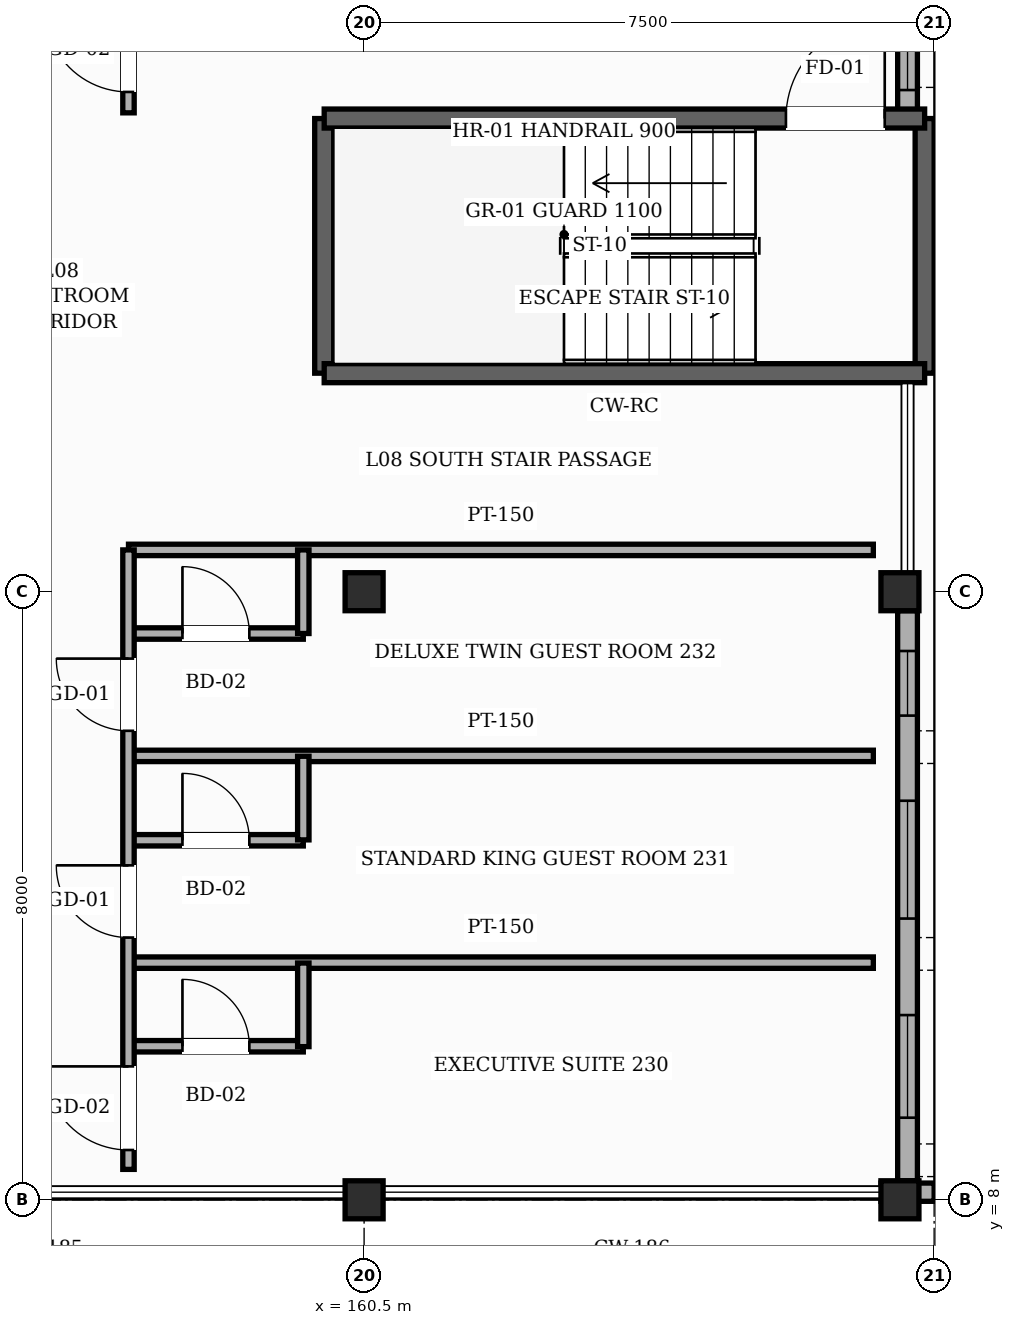
"""IFC4 building model, lengths in metres.
Left out: names, types, materials, properties, quantities, classifications, styles, units other than length and angle.
Written with IfcOpenShell. Run it as: python <this file> out.ifc"""

import sys

from ifc_helpers import new_model, si_unit, direction, frame, frame_2d, origin, origin_2d, place, context, subcontext, project, spatial, rectangle, hollow_rectangle, extrude, element, fill, save


model = new_model("IFC4")
c1 = context("Model", 3, precision=1e-05, world=origin(), true_north=direction((0.0, 1.0)))
c2 = subcontext(c1, "Body", "Model", "MODEL_VIEW")
j1 = project(units=[si_unit("LENGTHUNIT", "METRE"), si_unit("PLANEANGLEUNIT", "RADIAN")], contexts=[c1])
p1 = place(None, origin())
s1 = spatial("IfcSite", under=j1, at=p1, CompositionType="ELEMENT")
p2 = place(p1, origin())
s2 = spatial("IfcBuilding", under=s1, at=p2, CompositionType="ELEMENT")
p3 = place(p2, frame((0.0, 0.0, 35.4)))
s3 = spatial("IfcBuildingStorey", under=s2, at=p3, CompositionType="ELEMENT", Elevation=35.4)
for number, where, z_axis, x_axis in (
    (1, (160.5, 8.0, 0.0), (0.0, 0.0, 1.0), (1.0, 0.0, 0.0)),
    (2, (160.5, 16.0, 0.0), (0.0, 0.0, 1.0), (1.0, 0.0, 0.0)),
    (3, (167.55, 8.0, 0.0), (0.0, 0.0, 1.0), (1.0, 0.0, 0.0)),
    (4, (167.55, 16.0, 0.0), (0.0, 0.0, 1.0), (1.0, 0.0, 0.0)),
):
    element("IfcColumn", number, at=place(p3, frame(where, z_axis=z_axis, x_axis=x_axis)), inside=s3, PredefinedType="COLUMN", context=c2, shape_type="SweptSolid", body=[
        extrude(hollow_rectangle(XDim=0.5, YDim=0.5, WallThickness=0.022, InnerFilletRadius=0.022, OuterFilletRadius=0.044, at=origin_2d()), origin(), (0.0, 0.0, 1.0), 3.6),
    ])
p4 = place(p3, frame((167.65, 15.75, 0.0), z_axis=(0.0, 0.0, 1.0), x_axis=(0.0, -1.0, 0.0)))
e5 = element("IfcWall", 5, at=p4, inside=s3, PredefinedType="SOLIDWALL", context=c2, shape_type="SweptSolid", body=[
    extrude(rectangle(XDim=7.5, YDim=0.26, at=frame_2d((3.75, 0.0))), origin(), (0.0, 0.0, 1.0), 2.755),
])
p5 = place(p4, frame((5.32, 0.0, 0.85)))
e6 = element("IfcOpeningElement", 6, at=p5, cuts=e5, PredefinedType="OPENING", context=c2, shape_type="SweptSolid", body=[
    extrude(rectangle(XDim=1.35, YDim=1.65, at=frame_2d((0.675, 0.825))), frame((0.0, 0.14, 0.0), z_axis=(0.0, -1.0, 0.0), x_axis=(1.0, 0.0, 0.0)), (0.0, 0.0, 1.0), 0.28),
])
p6 = place(p4, frame((2.5, 0.0, 0.85)))
e7 = element("IfcOpeningElement", 7, at=p6, cuts=e5, PredefinedType="OPENING", context=c2, shape_type="SweptSolid", body=[
    extrude(rectangle(XDim=1.55, YDim=1.65, at=frame_2d((0.775, 0.825))), frame((0.0, 0.14, 0.0), z_axis=(0.0, -1.0, 0.0), x_axis=(1.0, 0.0, 0.0)), (0.0, 0.0, 1.0), 0.28),
])
p7 = place(p4, frame((0.53, 0.0, 0.85)))
e8 = element("IfcOpeningElement", 8, at=p7, cuts=e5, PredefinedType="OPENING", context=c2, shape_type="SweptSolid", body=[
    extrude(rectangle(XDim=0.85, YDim=1.35, at=frame_2d((0.425, 0.675))), frame((0.0, 0.14, 0.0), z_axis=(0.0, -1.0, 0.0), x_axis=(1.0, 0.0, 0.0)), (0.0, 0.0, 1.0), 0.28),
])
p8 = place(p3, frame((167.65, 23.75, 0.0), z_axis=(0.0, 0.0, 1.0), x_axis=(0.0, -1.0, 0.0)))
e9 = element("IfcWall", 9, at=p8, inside=s3, PredefinedType="SOLIDWALL", context=c2, shape_type="SweptSolid", body=[
    extrude(rectangle(XDim=1.525, YDim=0.26, at=frame_2d((0.762, 0.0))), origin(), (0.0, 0.0, 1.0), 3.365),
])
p9 = place(p8, frame((0.3, 0.0, 0.85)))
e10 = element("IfcOpeningElement", 10, at=p9, cuts=e9, PredefinedType="OPENING", context=c2, shape_type="SweptSolid", body=[
    extrude(rectangle(XDim=0.85, YDim=1.35, at=frame_2d((0.425, 0.675))), frame((0.0, 0.14, 0.0), z_axis=(0.0, -1.0, 0.0), x_axis=(1.0, 0.0, 0.0)), (0.0, 0.0, 1.0), 0.28),
])
p10 = place(p3, frame((168.0, 8.1, 0.0), z_axis=(0.0, 0.0, 1.0), x_axis=(-1.0, 0.0, 0.0)))
e11 = element("IfcWall", 11, at=p10, inside=s3, PredefinedType="SOLIDWALL", context=c2, shape_type="SweptSolid", body=[
    extrude(rectangle(XDim=0.7, YDim=0.24, at=frame_2d((0.35, 0.0))), origin(), (0.0, 0.0, 1.0), 3.365),
])
for number, where, z_axis, x_axis in (
    (12, (167.875, 22.225, 0.0), (0.0, 0.0, 1.0), (0.0, -1.0, 0.0)),
    (13, (159.975, 18.875, 0.0), (0.0, 0.0, 1.0), (0.0, 1.0, 0.0)),
):
    element("IfcWall", number, at=place(p3, frame(where, z_axis=z_axis, x_axis=x_axis)), inside=s3, PredefinedType="SHEAR", context=c2, shape_type="SweptSolid", body=[
        extrude(rectangle(XDim=3.35, YDim=0.25, at=frame_2d((1.675, 0.0))), origin(), (0.0, 0.0, 1.0), 3.38),
    ])
p11 = place(p3, frame((159.975, 22.225, 0.0), z_axis=(0.0, 0.0, 1.0), x_axis=(1.0, 0.0, 0.0)))
e14 = element("IfcWall", 14, at=p11, inside=s3, PredefinedType="SHEAR", context=c2, shape_type="SweptSolid", body=[
    extrude(rectangle(XDim=7.9, YDim=0.25, at=frame_2d((3.95, 0.0))), origin(), (0.0, 0.0, 1.0), 3.38),
])
p12 = place(p11, frame((6.075, 0.0, 0.0)))
e15 = element("IfcOpeningElement", 15, at=p12, cuts=e14, PredefinedType="OPENING", context=c2, shape_type="SweptSolid", body=[
    extrude(rectangle(XDim=1.3, YDim=2.2, at=frame_2d((0.65, 1.1))), frame((0.0, 0.135, 0.0), z_axis=(0.0, -1.0, 0.0), x_axis=(1.0, 0.0, 0.0)), (0.0, 0.0, 1.0), 0.27),
])
p13 = place(p3, frame((167.875, 18.875, 0.0), z_axis=(0.0, 0.0, 1.0), x_axis=(-1.0, 0.0, 0.0)))
e16 = element("IfcWall", 16, at=p13, inside=s3, PredefinedType="SHEAR", context=c2, shape_type="SweptSolid", body=[
    extrude(rectangle(XDim=7.9, YDim=0.25, at=frame_2d((3.95, 0.0))), origin(), (0.0, 0.0, 1.0), 3.38),
])
p14 = place(p3, frame((157.4, 10.02, 0.0), z_axis=(0.0, 0.0, 1.0), x_axis=(1.0, 0.0, 0.0)))
e17 = element("IfcWall", 17, at=p14, inside=s3, PredefinedType="PARTITIONING", context=c2, shape_type="SweptSolid", body=[
    extrude(rectangle(XDim=2.3, YDim=0.15, at=frame_2d((1.15, 0.0))), origin(), (0.0, 0.0, 1.0), 3.365),
])
p15 = place(p14, frame((0.71, 0.0, 0.0)))
e18 = element("IfcOpeningElement", 18, at=p15, cuts=e17, PredefinedType="OPENING", context=c2, shape_type="SweptSolid", body=[
    extrude(rectangle(XDim=0.88, YDim=2.12, at=frame_2d((0.44, 1.06))), frame((0.0, 0.085, 0.0), z_axis=(0.0, -1.0, 0.0), x_axis=(1.0, 0.0, 0.0)), (0.0, 0.0, 1.0), 0.17),
])
p16 = place(p3, frame((157.4, 11.12, 0.0), z_axis=(0.0, 0.0, 1.0), x_axis=(1.0, 0.0, 0.0)))
e19 = element("IfcWall", 19, at=p16, inside=s3, PredefinedType="PARTITIONING", context=c2, shape_type="SweptSolid", body=[
    extrude(rectangle(XDim=9.8, YDim=0.15, at=frame_2d((4.9, 0.0))), origin(), (0.0, 0.0, 1.0), 3.365),
])
p17 = place(p3, frame((157.4, 12.73, 0.0), z_axis=(0.0, 0.0, 1.0), x_axis=(1.0, 0.0, 0.0)))
e20 = element("IfcWall", 20, at=p17, inside=s3, PredefinedType="PARTITIONING", context=c2, shape_type="SweptSolid", body=[
    extrude(rectangle(XDim=2.3, YDim=0.15, at=frame_2d((1.15, 0.0))), origin(), (0.0, 0.0, 1.0), 3.365),
])
p18 = place(p17, frame((0.71, 0.0, 0.0)))
e21 = element("IfcOpeningElement", 21, at=p18, cuts=e20, PredefinedType="OPENING", context=c2, shape_type="SweptSolid", body=[
    extrude(rectangle(XDim=0.88, YDim=2.12, at=frame_2d((0.44, 1.06))), frame((0.0, 0.085, 0.0), z_axis=(0.0, -1.0, 0.0), x_axis=(1.0, 0.0, 0.0)), (0.0, 0.0, 1.0), 0.17),
])
p19 = place(p3, frame((157.4, 13.84, 0.0), z_axis=(0.0, 0.0, 1.0), x_axis=(1.0, 0.0, 0.0)))
e22 = element("IfcWall", 22, at=p19, inside=s3, PredefinedType="PARTITIONING", context=c2, shape_type="SweptSolid", body=[
    extrude(rectangle(XDim=9.8, YDim=0.15, at=frame_2d((4.9, 0.0))), origin(), (0.0, 0.0, 1.0), 3.365),
])
p20 = place(p3, frame((157.4, 15.45, 0.0), z_axis=(0.0, 0.0, 1.0), x_axis=(1.0, 0.0, 0.0)))
e23 = element("IfcWall", 23, at=p20, inside=s3, PredefinedType="PARTITIONING", context=c2, shape_type="SweptSolid", body=[
    extrude(rectangle(XDim=2.3, YDim=0.15, at=frame_2d((1.15, 0.0))), origin(), (0.0, 0.0, 1.0), 3.365),
])
p21 = place(p20, frame((0.71, 0.0, 0.0)))
e24 = element("IfcOpeningElement", 24, at=p21, cuts=e23, PredefinedType="OPENING", context=c2, shape_type="SweptSolid", body=[
    extrude(rectangle(XDim=0.88, YDim=2.12, at=frame_2d((0.44, 1.06))), frame((0.0, 0.085, 0.0), z_axis=(0.0, -1.0, 0.0), x_axis=(1.0, 0.0, 0.0)), (0.0, 0.0, 1.0), 0.17),
])
p22 = place(p3, frame((157.4, 16.55, 0.0), z_axis=(0.0, 0.0, 1.0), x_axis=(1.0, 0.0, 0.0)))
e25 = element("IfcWall", 25, at=p22, inside=s3, PredefinedType="PARTITIONING", context=c2, shape_type="SweptSolid", body=[
    extrude(rectangle(XDim=9.8, YDim=0.15, at=frame_2d((4.9, 0.0))), origin(), (0.0, 0.0, 1.0), 3.365),
])
p23 = place(p3, frame((157.4, 8.4, 0.0), z_axis=(0.0, 0.0, 1.0), x_axis=(0.0, 1.0, 0.0)))
e26 = element("IfcWall", 26, at=p23, inside=s3, PredefinedType="PARTITIONING", context=c2, shape_type="SweptSolid", body=[
    extrude(rectangle(XDim=8.15, YDim=0.15, at=frame_2d((4.075, 0.0))), origin(), (0.0, 0.0, 1.0), 3.365),
])
p24 = place(p23, frame((0.255, 0.0, 0.0)))
e27 = element("IfcOpeningElement", 27, at=p24, cuts=e26, PredefinedType="OPENING", context=c2, shape_type="SweptSolid", body=[
    extrude(rectangle(XDim=1.1, YDim=2.2, at=frame_2d((0.55, 1.1))), frame((0.0, 0.085, 0.0), z_axis=(0.0, -1.0, 0.0), x_axis=(1.0, 0.0, 0.0)), (0.0, 0.0, 1.0), 0.17),
])
p25 = place(p23, frame((3.05, 0.0, 0.0)))
e28 = element("IfcOpeningElement", 28, at=p25, cuts=e26, PredefinedType="OPENING", context=c2, shape_type="SweptSolid", body=[
    extrude(rectangle(XDim=0.95, YDim=2.15, at=frame_2d((0.475, 1.075))), frame((0.0, 0.085, 0.0), z_axis=(0.0, -1.0, 0.0), x_axis=(1.0, 0.0, 0.0)), (0.0, 0.0, 1.0), 0.17),
])
p26 = place(p23, frame((5.77, 0.0, 0.0)))
e29 = element("IfcOpeningElement", 29, at=p26, cuts=e26, PredefinedType="OPENING", context=c2, shape_type="SweptSolid", body=[
    extrude(rectangle(XDim=0.95, YDim=2.15, at=frame_2d((0.475, 1.075))), frame((0.0, 0.085, 0.0), z_axis=(0.0, -1.0, 0.0), x_axis=(1.0, 0.0, 0.0)), (0.0, 0.0, 1.0), 0.17),
])
p27 = place(p3, frame((157.4, 22.3, 0.0), z_axis=(0.0, 0.0, 1.0), x_axis=(0.0, 1.0, 0.0)))
e30 = element("IfcWall", 30, at=p27, inside=s3, PredefinedType="PARTITIONING", context=c2, shape_type="SweptSolid", body=[
    extrude(rectangle(XDim=48.5, YDim=0.15, at=frame_2d((24.25, 0.0))), origin(), (0.0, 0.0, 1.0), 3.365),
])
p28 = place(p27, frame((24.875, 0.0, 0.0)))
e31 = element("IfcOpeningElement", 31, at=p28, cuts=e30, PredefinedType="OPENING", context=c2, shape_type="SweptSolid", body=[
    extrude(rectangle(XDim=1.65, YDim=2.35, at=frame_2d((0.825, 1.175))), frame((0.0, 0.085, 0.0), z_axis=(0.0, -1.0, 0.0), x_axis=(1.0, 0.0, 0.0)), (0.0, 0.0, 1.0), 0.17),
])
p29 = place(p27, frame((0.275, 0.0, 0.0)))
e32 = element("IfcOpeningElement", 32, at=p29, cuts=e30, PredefinedType="OPENING", context=c2, shape_type="SweptSolid", body=[
    extrude(rectangle(XDim=1.1, YDim=2.2, at=frame_2d((0.55, 1.1))), frame((0.0, 0.085, 0.0), z_axis=(0.0, -1.0, 0.0), x_axis=(1.0, 0.0, 0.0)), (0.0, 0.0, 1.0), 0.17),
])
p30 = place(p27, frame((3.11, 0.0, 0.0)))
e33 = element("IfcOpeningElement", 33, at=p30, cuts=e30, PredefinedType="OPENING", context=c2, shape_type="SweptSolid", body=[
    extrude(rectangle(XDim=0.95, YDim=2.15, at=frame_2d((0.475, 1.075))), frame((0.0, 0.085, 0.0), z_axis=(0.0, -1.0, 0.0), x_axis=(1.0, 0.0, 0.0)), (0.0, 0.0, 1.0), 0.17),
])
p31 = place(p27, frame((5.865, 0.0, 0.0)))
e34 = element("IfcOpeningElement", 34, at=p31, cuts=e30, PredefinedType="OPENING", context=c2, shape_type="SweptSolid", body=[
    extrude(rectangle(XDim=0.95, YDim=2.15, at=frame_2d((0.475, 1.075))), frame((0.0, 0.085, 0.0), z_axis=(0.0, -1.0, 0.0), x_axis=(1.0, 0.0, 0.0)), (0.0, 0.0, 1.0), 0.17),
])
p32 = place(p27, frame((8.625, 0.0, 0.0)))
e35 = element("IfcOpeningElement", 35, at=p32, cuts=e30, PredefinedType="OPENING", context=c2, shape_type="SweptSolid", body=[
    extrude(rectangle(XDim=0.95, YDim=2.15, at=frame_2d((0.475, 1.075))), frame((0.0, 0.085, 0.0), z_axis=(0.0, -1.0, 0.0), x_axis=(1.0, 0.0, 0.0)), (0.0, 0.0, 1.0), 0.17),
])
p33 = place(p27, frame((11.38, 0.0, 0.0)))
e36 = element("IfcOpeningElement", 36, at=p33, cuts=e30, PredefinedType="OPENING", context=c2, shape_type="SweptSolid", body=[
    extrude(rectangle(XDim=0.95, YDim=2.15, at=frame_2d((0.475, 1.075))), frame((0.0, 0.085, 0.0), z_axis=(0.0, -1.0, 0.0), x_axis=(1.0, 0.0, 0.0)), (0.0, 0.0, 1.0), 0.17),
])
p34 = place(p27, frame((14.14, 0.0, 0.0)))
e37 = element("IfcOpeningElement", 37, at=p34, cuts=e30, PredefinedType="OPENING", context=c2, shape_type="SweptSolid", body=[
    extrude(rectangle(XDim=0.95, YDim=2.15, at=frame_2d((0.475, 1.075))), frame((0.0, 0.085, 0.0), z_axis=(0.0, -1.0, 0.0), x_axis=(1.0, 0.0, 0.0)), (0.0, 0.0, 1.0), 0.17),
])
p35 = place(p27, frame((16.895, 0.0, 0.0)))
e38 = element("IfcOpeningElement", 38, at=p35, cuts=e30, PredefinedType="OPENING", context=c2, shape_type="SweptSolid", body=[
    extrude(rectangle(XDim=0.95, YDim=2.15, at=frame_2d((0.475, 1.075))), frame((0.0, 0.085, 0.0), z_axis=(0.0, -1.0, 0.0), x_axis=(1.0, 0.0, 0.0)), (0.0, 0.0, 1.0), 0.17),
])
p36 = place(p27, frame((32.37, 0.0, 0.0)))
e39 = element("IfcOpeningElement", 39, at=p36, cuts=e30, PredefinedType="OPENING", context=c2, shape_type="SweptSolid", body=[
    extrude(rectangle(XDim=1.1, YDim=2.2, at=frame_2d((0.55, 1.1))), frame((0.0, 0.085, 0.0), z_axis=(0.0, -1.0, 0.0), x_axis=(1.0, 0.0, 0.0)), (0.0, 0.0, 1.0), 0.17),
])
p37 = place(p27, frame((35.175, 0.0, 0.0)))
e40 = element("IfcOpeningElement", 40, at=p37, cuts=e30, PredefinedType="OPENING", context=c2, shape_type="SweptSolid", body=[
    extrude(rectangle(XDim=0.95, YDim=2.15, at=frame_2d((0.475, 1.075))), frame((0.0, 0.085, 0.0), z_axis=(0.0, -1.0, 0.0), x_axis=(1.0, 0.0, 0.0)), (0.0, 0.0, 1.0), 0.17),
])
p38 = place(p27, frame((37.91, 0.0, 0.0)))
e41 = element("IfcOpeningElement", 41, at=p38, cuts=e30, PredefinedType="OPENING", context=c2, shape_type="SweptSolid", body=[
    extrude(rectangle(XDim=0.95, YDim=2.15, at=frame_2d((0.475, 1.075))), frame((0.0, 0.085, 0.0), z_axis=(0.0, -1.0, 0.0), x_axis=(1.0, 0.0, 0.0)), (0.0, 0.0, 1.0), 0.17),
])
p39 = place(p27, frame((40.64, 0.0, 0.0)))
e42 = element("IfcOpeningElement", 42, at=p39, cuts=e30, PredefinedType="OPENING", context=c2, shape_type="SweptSolid", body=[
    extrude(rectangle(XDim=0.95, YDim=2.15, at=frame_2d((0.475, 1.075))), frame((0.0, 0.085, 0.0), z_axis=(0.0, -1.0, 0.0), x_axis=(1.0, 0.0, 0.0)), (0.0, 0.0, 1.0), 0.17),
])
p40 = place(p27, frame((43.375, 0.0, 0.0)))
e43 = element("IfcOpeningElement", 43, at=p40, cuts=e30, PredefinedType="OPENING", context=c2, shape_type="SweptSolid", body=[
    extrude(rectangle(XDim=0.95, YDim=2.15, at=frame_2d((0.475, 1.075))), frame((0.0, 0.085, 0.0), z_axis=(0.0, -1.0, 0.0), x_axis=(1.0, 0.0, 0.0)), (0.0, 0.0, 1.0), 0.17),
])
p41 = place(p27, frame((46.11, 0.0, 0.0)))
e44 = element("IfcOpeningElement", 44, at=p41, cuts=e30, PredefinedType="OPENING", context=c2, shape_type="SweptSolid", body=[
    extrude(rectangle(XDim=0.95, YDim=2.15, at=frame_2d((0.475, 1.075))), frame((0.0, 0.085, 0.0), z_axis=(0.0, -1.0, 0.0), x_axis=(1.0, 0.0, 0.0)), (0.0, 0.0, 1.0), 0.17),
])
p42 = place(p3, frame((159.7, 10.015, 0.0), z_axis=(0.0, 0.0, 1.0), x_axis=(0.0, 1.0, 0.0)))
e45 = element("IfcWall", 45, at=p42, inside=s3, PredefinedType="PARTITIONING", context=c2, shape_type="SweptSolid", body=[
    extrude(rectangle(XDim=1.1, YDim=0.15, at=frame_2d((0.55, 0.0))), origin(), (0.0, 0.0, 1.0), 3.365),
])
p43 = place(p3, frame((159.7, 12.735, 0.0), z_axis=(0.0, 0.0, 1.0), x_axis=(0.0, 1.0, 0.0)))
e46 = element("IfcWall", 46, at=p43, inside=s3, PredefinedType="PARTITIONING", context=c2, shape_type="SweptSolid", body=[
    extrude(rectangle(XDim=1.1, YDim=0.15, at=frame_2d((0.55, 0.0))), origin(), (0.0, 0.0, 1.0), 3.365),
])
p44 = place(p3, frame((159.7, 15.45, 0.0), z_axis=(0.0, 0.0, 1.0), x_axis=(0.0, 1.0, 0.0)))
e47 = element("IfcWall", 47, at=p44, inside=s3, PredefinedType="PARTITIONING", context=c2, shape_type="SweptSolid", body=[
    extrude(rectangle(XDim=1.1, YDim=0.15, at=frame_2d((0.55, 0.0))), origin(), (0.0, 0.0, 1.0), 3.365),
])
p45 = place(p5, origin())
e48 = element("IfcWindow", 48, at=p45, inside=s3, PartitioningType="SINGLE_PANEL", PredefinedType="WINDOW", context=c2, shape_type="SweptSolid", body=[
    extrude(rectangle(XDim=1.35, YDim=1.65, at=frame_2d((0.675, 0.825))), frame((0.0, 0.03, 0.0), z_axis=(0.0, -1.0, 0.0), x_axis=(1.0, 0.0, 0.0)), (0.0, 0.0, 1.0), 0.06),
])
fill(e6, e48)
p46 = place(p6, origin())
e49 = element("IfcWindow", 49, at=p46, inside=s3, PartitioningType="SINGLE_PANEL", PredefinedType="WINDOW", context=c2, shape_type="SweptSolid", body=[
    extrude(rectangle(XDim=1.55, YDim=1.65, at=frame_2d((0.775, 0.825))), frame((0.0, 0.03, 0.0), z_axis=(0.0, -1.0, 0.0), x_axis=(1.0, 0.0, 0.0)), (0.0, 0.0, 1.0), 0.06),
])
fill(e7, e49)
p47 = place(p7, origin())
e50 = element("IfcWindow", 50, at=p47, inside=s3, PartitioningType="SINGLE_PANEL", PredefinedType="WINDOW", context=c2, shape_type="SweptSolid", body=[
    extrude(rectangle(XDim=0.85, YDim=1.35, at=frame_2d((0.425, 0.675))), frame((0.0, 0.03, 0.0), z_axis=(0.0, -1.0, 0.0), x_axis=(1.0, 0.0, 0.0)), (0.0, 0.0, 1.0), 0.06),
])
fill(e8, e50)
p48 = place(p9, origin())
e51 = element("IfcWindow", 51, at=p48, inside=s3, PartitioningType="SINGLE_PANEL", PredefinedType="WINDOW", context=c2, shape_type="SweptSolid", body=[
    extrude(rectangle(XDim=0.85, YDim=1.35, at=frame_2d((0.425, 0.675))), frame((0.0, 0.03, 0.0), z_axis=(0.0, -1.0, 0.0), x_axis=(1.0, 0.0, 0.0)), (0.0, 0.0, 1.0), 0.06),
])
fill(e10, e51)
p49 = place(p12, origin())
e52 = element("IfcDoor", 52, at=p49, inside=s3, OperationType="SINGLE_SWING_RIGHT", PredefinedType="DOOR", context=c2, shape_type="SweptSolid", body=[
    extrude(rectangle(XDim=1.3, YDim=2.2, at=frame_2d((0.65, 1.1))), frame((0.0, 0.025, 0.0), z_axis=(0.0, -1.0, 0.0), x_axis=(1.0, 0.0, 0.0)), (0.0, 0.0, 1.0), 0.05),
])
fill(e15, e52)
p50 = place(p24, origin())
e53 = element("IfcDoor", 53, at=p50, inside=s3, OperationType="SINGLE_SWING_RIGHT", PredefinedType="DOOR", context=c2, shape_type="SweptSolid", body=[
    extrude(rectangle(XDim=1.1, YDim=2.2, at=frame_2d((0.55, 1.1))), frame((0.0, 0.025, 0.0), z_axis=(0.0, -1.0, 0.0), x_axis=(1.0, 0.0, 0.0)), (0.0, 0.0, 1.0), 0.05),
])
fill(e27, e53)
p51 = place(p15, origin())
e54 = element("IfcDoor", 54, at=p51, inside=s3, OperationType="SINGLE_SWING_LEFT", PredefinedType="DOOR", context=c2, shape_type="SweptSolid", body=[
    extrude(rectangle(XDim=0.88, YDim=2.12, at=frame_2d((0.44, 1.06))), frame((0.0, 0.025, 0.0), z_axis=(0.0, -1.0, 0.0), x_axis=(1.0, 0.0, 0.0)), (0.0, 0.0, 1.0), 0.05),
])
fill(e18, e54)
p52 = place(p25, origin())
e55 = element("IfcDoor", 55, at=p52, inside=s3, OperationType="SINGLE_SWING_RIGHT", PredefinedType="DOOR", context=c2, shape_type="SweptSolid", body=[
    extrude(rectangle(XDim=0.95, YDim=2.15, at=frame_2d((0.475, 1.075))), frame((0.0, 0.025, 0.0), z_axis=(0.0, -1.0, 0.0), x_axis=(1.0, 0.0, 0.0)), (0.0, 0.0, 1.0), 0.05),
])
fill(e28, e55)
p53 = place(p18, origin())
e56 = element("IfcDoor", 56, at=p53, inside=s3, OperationType="SINGLE_SWING_LEFT", PredefinedType="DOOR", context=c2, shape_type="SweptSolid", body=[
    extrude(rectangle(XDim=0.88, YDim=2.12, at=frame_2d((0.44, 1.06))), frame((0.0, 0.025, 0.0), z_axis=(0.0, -1.0, 0.0), x_axis=(1.0, 0.0, 0.0)), (0.0, 0.0, 1.0), 0.05),
])
fill(e21, e56)
p54 = place(p26, origin())
e57 = element("IfcDoor", 57, at=p54, inside=s3, OperationType="SINGLE_SWING_RIGHT", PredefinedType="DOOR", context=c2, shape_type="SweptSolid", body=[
    extrude(rectangle(XDim=0.95, YDim=2.15, at=frame_2d((0.475, 1.075))), frame((0.0, 0.025, 0.0), z_axis=(0.0, -1.0, 0.0), x_axis=(1.0, 0.0, 0.0)), (0.0, 0.0, 1.0), 0.05),
])
fill(e29, e57)
p55 = place(p21, origin())
e58 = element("IfcDoor", 58, at=p55, inside=s3, OperationType="SINGLE_SWING_LEFT", PredefinedType="DOOR", context=c2, shape_type="SweptSolid", body=[
    extrude(rectangle(XDim=0.88, YDim=2.12, at=frame_2d((0.44, 1.06))), frame((0.0, 0.025, 0.0), z_axis=(0.0, -1.0, 0.0), x_axis=(1.0, 0.0, 0.0)), (0.0, 0.0, 1.0), 0.05),
])
fill(e24, e58)
p56 = place(p29, origin())
e59 = element("IfcDoor", 59, at=p56, inside=s3, OperationType="SINGLE_SWING_RIGHT", PredefinedType="DOOR", context=c2, shape_type="SweptSolid", body=[
    extrude(rectangle(XDim=1.1, YDim=2.2, at=frame_2d((0.55, 1.1))), frame((0.0, 0.025, 0.0), z_axis=(0.0, -1.0, 0.0), x_axis=(1.0, 0.0, 0.0)), (0.0, 0.0, 1.0), 0.05),
])
fill(e32, e59)
save(model, sys.argv[1])
